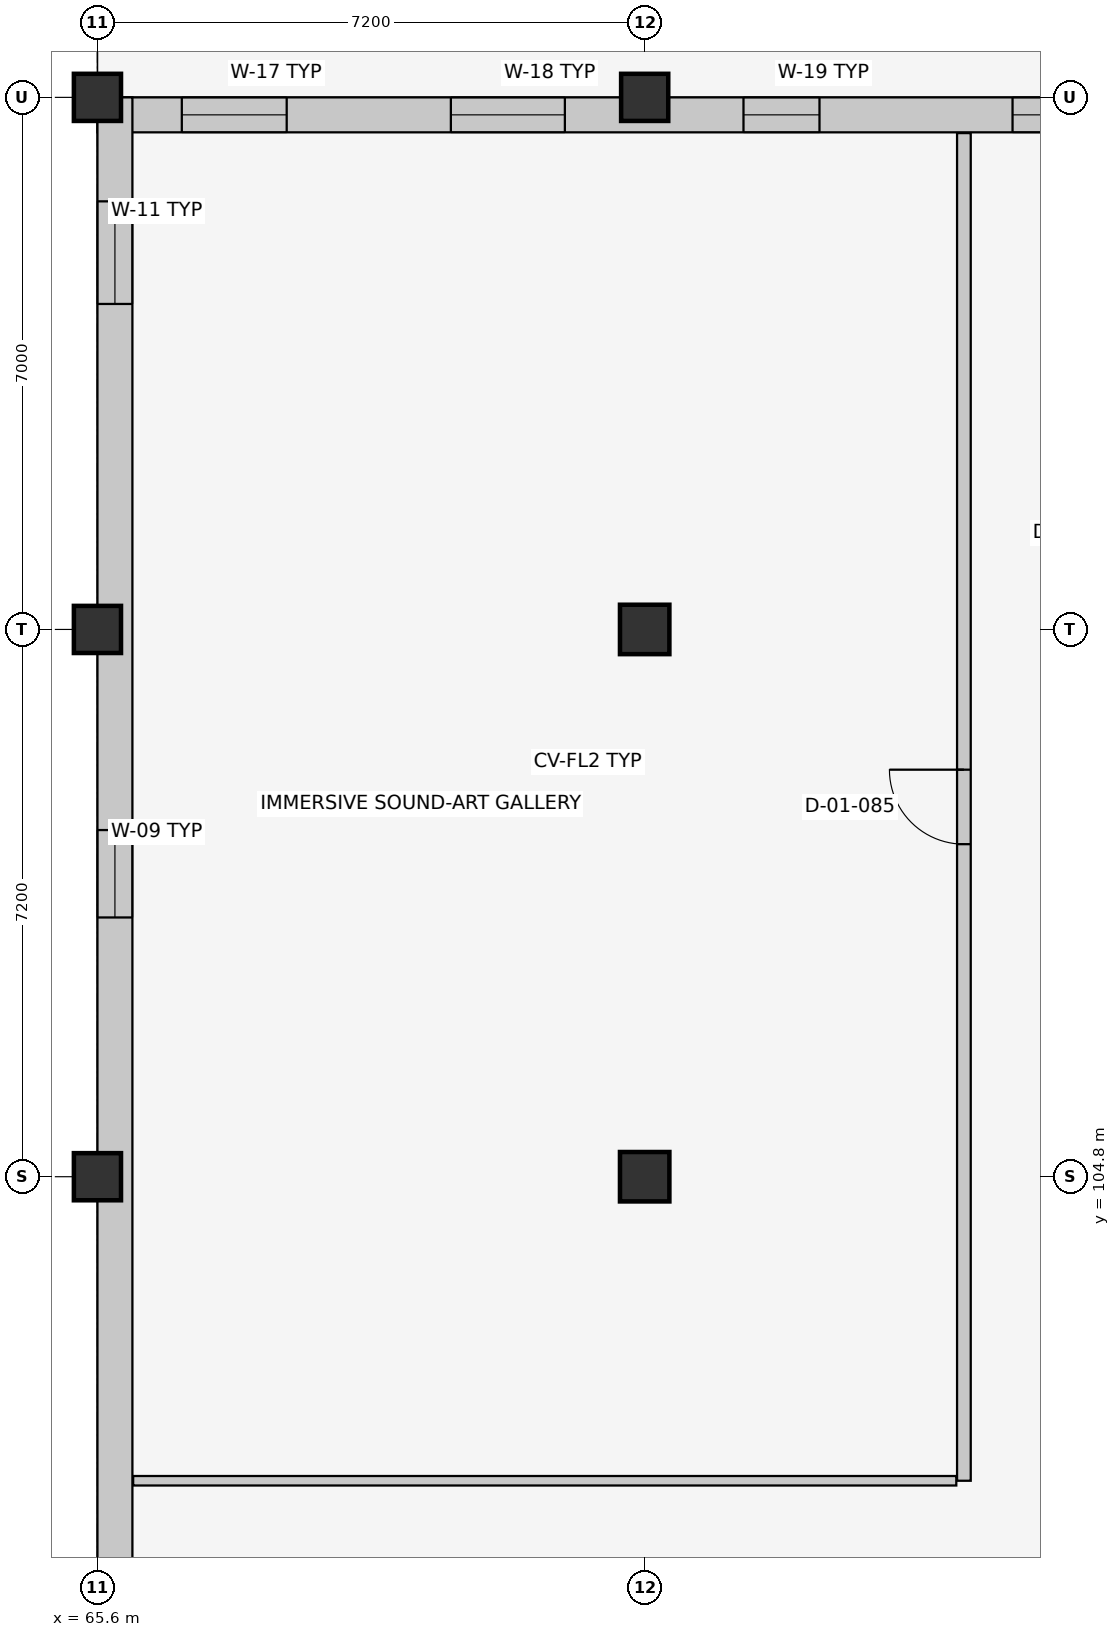
"""IFC4 building model, lengths in metres.
Left out: names, types, materials, properties, quantities, classifications, styles, units other than length and angle.
Written with IfcOpenShell. Run it as: python <this file> out.ifc"""

import sys

from ifc_helpers import new_model, si_unit, direction, frame, frame_2d, origin, origin_2d, place, context, subcontext, project, spatial, rectangle, extrude, element, fill, save


model = new_model("IFC4")
c1 = context("Model", 3, precision=1e-05, world=origin(), true_north=direction((0.0, 1.0)))
c2 = subcontext(c1, "Body", "Model", "MODEL_VIEW")
j1 = project(units=[si_unit("LENGTHUNIT", "METRE"), si_unit("PLANEANGLEUNIT", "RADIAN")], contexts=[c1])
p1 = place(None, origin())
s1 = spatial("IfcSite", under=j1, at=p1, CompositionType="ELEMENT")
p2 = place(p1, origin())
s2 = spatial("IfcBuilding", under=s1, at=p2, CompositionType="ELEMENT")
p3 = place(p2, frame((0.0, 0.0, 5.4)))
s3 = spatial("IfcBuildingStorey", under=s2, at=p3, CompositionType="ELEMENT", Elevation=5.4)
for number, where, z_axis, x_axis in (
    (1, (65.6, 104.8, 0.0), (0.0, 0.0, 1.0), (1.0, 0.0, 0.0)),
    (2, (65.6, 112.0, 0.0), (0.0, 0.0, 1.0), (1.0, 0.0, 0.0)),
    (3, (65.6, 119.0, 0.0), (0.0, 0.0, 1.0), (1.0, 0.0, 0.0)),
):
    element("IfcColumn", number, at=place(p3, frame(where, z_axis=z_axis, x_axis=x_axis)), inside=s3, PredefinedType="COLUMN", context=c2, shape_type="SweptSolid", body=[
        extrude(rectangle(XDim=0.62, YDim=0.62, at=origin_2d()), origin(), (0.0, 0.0, 1.0), 4.2),
    ])
for number, where, z_axis, x_axis in (
    (4, (72.8, 104.8, 0.0), (0.0, 0.0, 1.0), (1.0, 0.0, 0.0)),
    (5, (72.8, 112.0, 0.0), (0.0, 0.0, 1.0), (1.0, 0.0, 0.0)),
):
    element("IfcColumn", number, at=place(p3, frame(where, z_axis=z_axis, x_axis=x_axis)), inside=s3, PredefinedType="COLUMN", context=c2, shape_type="SweptSolid", body=[
        extrude(rectangle(XDim=0.65, YDim=0.65, at=origin_2d()), origin(), (0.0, 0.0, 1.0), 4.2),
    ])
p4 = place(p3, frame((72.8, 119.0, 0.0), z_axis=(0.0, 0.0, 1.0), x_axis=(1.0, 0.0, 0.0)))
e6 = element("IfcColumn", 6, at=p4, inside=s3, PredefinedType="COLUMN", context=c2, shape_type="SweptSolid", body=[
    extrude(rectangle(XDim=0.62, YDim=0.62, at=origin_2d()), origin(), (0.0, 0.0, 1.0), 4.2),
])
p5 = place(p3, frame((65.6, 118.77, 0.0), z_axis=(0.0, 0.0, 1.0), x_axis=(1.0, 0.0, 0.0)))
e7 = element("IfcWall", 7, at=p5, inside=s3, PredefinedType="SOLIDWALL", context=c2, shape_type="SweptSolid", body=[
    extrude(rectangle(XDim=43.2, YDim=0.46, at=frame_2d((21.6, 0.0))), origin(), (0.0, 0.0, 1.0), 3.215),
])
p6 = place(p5, frame((1.11, 0.0, 0.9)))
e8 = element("IfcOpeningElement", 8, at=p6, cuts=e7, PredefinedType="OPENING", context=c2, shape_type="SweptSolid", body=[
    extrude(rectangle(XDim=1.38, YDim=1.6, at=frame_2d((0.69, 0.8))), frame((0.0, 0.242, 0.0), z_axis=(0.0, -1.0, 0.0), x_axis=(1.0, 0.0, 0.0)), (0.0, 0.0, 1.0), 0.484),
])
p7 = place(p5, frame((4.65, 0.0, 0.9)))
e9 = element("IfcOpeningElement", 9, at=p7, cuts=e7, PredefinedType="OPENING", context=c2, shape_type="SweptSolid", body=[
    extrude(rectangle(XDim=1.5, YDim=1.6, at=frame_2d((0.75, 0.8))), frame((0.0, 0.242, 0.0), z_axis=(0.0, -1.0, 0.0), x_axis=(1.0, 0.0, 0.0)), (0.0, 0.0, 1.0), 0.484),
])
p8 = place(p5, frame((8.5, 0.0, 0.9)))
e10 = element("IfcOpeningElement", 10, at=p8, cuts=e7, PredefinedType="OPENING", context=c2, shape_type="SweptSolid", body=[
    extrude(rectangle(XDim=1.0, YDim=1.75, at=frame_2d((0.5, 0.875))), frame((0.0, 0.242, 0.0), z_axis=(0.0, -1.0, 0.0), x_axis=(1.0, 0.0, 0.0)), (0.0, 0.0, 1.0), 0.484),
])
p9 = place(p5, frame((12.04, 0.0, 0.9)))
e11 = element("IfcOpeningElement", 11, at=p9, cuts=e7, PredefinedType="OPENING", context=c2, shape_type="SweptSolid", body=[
    extrude(rectangle(XDim=1.12, YDim=1.75, at=frame_2d((0.56, 0.875))), frame((0.0, 0.242, 0.0), z_axis=(0.0, -1.0, 0.0), x_axis=(1.0, 0.0, 0.0)), (0.0, 0.0, 1.0), 0.484),
])
p10 = place(p5, frame((15.58, 0.0, 0.9)))
e12 = element("IfcOpeningElement", 12, at=p10, cuts=e7, PredefinedType="OPENING", context=c2, shape_type="SweptSolid", body=[
    extrude(rectangle(XDim=1.24, YDim=1.75, at=frame_2d((0.62, 0.875))), frame((0.0, 0.242, 0.0), z_axis=(0.0, -1.0, 0.0), x_axis=(1.0, 0.0, 0.0)), (0.0, 0.0, 1.0), 0.484),
])
p11 = place(p5, frame((19.13, 0.0, 0.9)))
e13 = element("IfcOpeningElement", 13, at=p11, cuts=e7, PredefinedType="OPENING", context=c2, shape_type="SweptSolid", body=[
    extrude(rectangle(XDim=1.34, YDim=1.75, at=frame_2d((0.67, 0.875))), frame((0.0, 0.242, 0.0), z_axis=(0.0, -1.0, 0.0), x_axis=(1.0, 0.0, 0.0)), (0.0, 0.0, 1.0), 0.484),
])
p12 = place(p5, frame((22.68, 0.0, 0.9)))
e14 = element("IfcOpeningElement", 14, at=p12, cuts=e7, PredefinedType="OPENING", context=c2, shape_type="SweptSolid", body=[
    extrude(rectangle(XDim=1.44, YDim=1.75, at=frame_2d((0.72, 0.875))), frame((0.0, 0.242, 0.0), z_axis=(0.0, -1.0, 0.0), x_axis=(1.0, 0.0, 0.0)), (0.0, 0.0, 1.0), 0.484),
])
p13 = place(p5, frame((26.25, 0.0, 0.9)))
e15 = element("IfcOpeningElement", 15, at=p13, cuts=e7, PredefinedType="OPENING", context=c2, shape_type="SweptSolid", body=[
    extrude(rectangle(XDim=1.5, YDim=1.75, at=frame_2d((0.75, 0.875))), frame((0.0, 0.242, 0.0), z_axis=(0.0, -1.0, 0.0), x_axis=(1.0, 0.0, 0.0)), (0.0, 0.0, 1.0), 0.484),
])
p14 = place(p5, frame((30.15, 0.0, 0.9)))
e16 = element("IfcOpeningElement", 16, at=p14, cuts=e7, PredefinedType="OPENING", context=c2, shape_type="SweptSolid", body=[
    extrude(rectangle(XDim=0.9, YDim=1.35, at=frame_2d((0.45, 0.675))), frame((0.0, 0.242, 0.0), z_axis=(0.0, -1.0, 0.0), x_axis=(1.0, 0.0, 0.0)), (0.0, 0.0, 1.0), 0.484),
])
p15 = place(p5, frame((33.7, 0.0, 0.9)))
e17 = element("IfcOpeningElement", 17, at=p15, cuts=e7, PredefinedType="OPENING", context=c2, shape_type="SweptSolid", body=[
    extrude(rectangle(XDim=1.0, YDim=1.35, at=frame_2d((0.5, 0.675))), frame((0.0, 0.242, 0.0), z_axis=(0.0, -1.0, 0.0), x_axis=(1.0, 0.0, 0.0)), (0.0, 0.0, 1.0), 0.484),
])
p16 = place(p5, frame((37.25, 0.0, 0.9)))
e18 = element("IfcOpeningElement", 18, at=p16, cuts=e7, PredefinedType="OPENING", context=c2, shape_type="SweptSolid", body=[
    extrude(rectangle(XDim=1.1, YDim=1.35, at=frame_2d((0.55, 0.675))), frame((0.0, 0.242, 0.0), z_axis=(0.0, -1.0, 0.0), x_axis=(1.0, 0.0, 0.0)), (0.0, 0.0, 1.0), 0.484),
])
p17 = place(p5, frame((40.8, 0.0, 0.9)))
e19 = element("IfcOpeningElement", 19, at=p17, cuts=e7, PredefinedType="OPENING", context=c2, shape_type="SweptSolid", body=[
    extrude(rectangle(XDim=1.2, YDim=1.35, at=frame_2d((0.6, 0.675))), frame((0.0, 0.242, 0.0), z_axis=(0.0, -1.0, 0.0), x_axis=(1.0, 0.0, 0.0)), (0.0, 0.0, 1.0), 0.484),
])
p18 = place(p3, frame((65.83, 90.4, 0.0), z_axis=(0.0, 0.0, 1.0), x_axis=(0.0, 1.0, 0.0)))
e20 = element("IfcWall", 20, at=p18, inside=s3, PredefinedType="SOLIDWALL", context=c2, shape_type="SweptSolid", body=[
    extrude(rectangle(XDim=28.6, YDim=0.46, at=frame_2d((14.3, 0.0))), origin(), (0.0, 0.0, 1.0), 3.175),
])
p19 = place(p18, frame((1.393, 0.0, 0.9)))
e21 = element("IfcOpeningElement", 21, at=p19, cuts=e20, PredefinedType="OPENING", context=c2, shape_type="SweptSolid", body=[
    extrude(rectangle(XDim=1.3, YDim=1.35, at=frame_2d((0.65, 0.675))), frame((0.0, 0.242, 0.0), z_axis=(0.0, -1.0, 0.0), x_axis=(1.0, 0.0, 0.0)), (0.0, 0.0, 1.0), 0.484),
])
p20 = place(p18, frame((17.811, 0.0, 0.9)))
e22 = element("IfcOpeningElement", 22, at=p20, cuts=e20, PredefinedType="OPENING", context=c2, shape_type="SweptSolid", body=[
    extrude(rectangle(XDim=1.15, YDim=1.45, at=frame_2d((0.575, 0.725))), frame((0.0, 0.242, 0.0), z_axis=(0.0, -1.0, 0.0), x_axis=(1.0, 0.0, 0.0)), (0.0, 0.0, 1.0), 0.484),
])
p21 = place(p18, frame((25.882, 0.0, 0.9)))
e23 = element("IfcOpeningElement", 23, at=p21, cuts=e20, PredefinedType="OPENING", context=c2, shape_type="SweptSolid", body=[
    extrude(rectangle(XDim=1.35, YDim=1.45, at=frame_2d((0.675, 0.725))), frame((0.0, 0.242, 0.0), z_axis=(0.0, -1.0, 0.0), x_axis=(1.0, 0.0, 0.0)), (0.0, 0.0, 1.0), 0.484),
])
p22 = place(p3, frame((77.0, 100.8, 0.0), z_axis=(0.0, 0.0, 1.0), x_axis=(0.0, 1.0, 0.0)))
e24 = element("IfcWall", 24, at=p22, inside=s3, PredefinedType="PARTITIONING", context=c2, shape_type="SweptSolid", body=[
    extrude(rectangle(XDim=17.73, YDim=0.18, at=frame_2d((8.865, 0.0))), origin(), (0.0, 0.0, 1.0), 3.92),
])
p23 = place(p22, frame((8.375, 0.0, 0.0)))
e25 = element("IfcOpeningElement", 25, at=p23, cuts=e24, PredefinedType="OPENING", context=c2, shape_type="SweptSolid", body=[
    extrude(rectangle(XDim=0.98, YDim=2.12, at=frame_2d((0.49, 1.06))), frame((0.0, 0.102, 0.0), z_axis=(0.0, -1.0, 0.0), x_axis=(1.0, 0.0, 0.0)), (0.0, 0.0, 1.0), 0.204),
])
p24 = place(p3, frame((66.07, 100.8, 0.0), z_axis=(0.0, 0.0, 1.0), x_axis=(1.0, 0.0, 0.0)))
e26 = element("IfcWall", 26, at=p24, inside=s3, PredefinedType="PARTITIONING", context=c2, shape_type="SweptSolid", body=[
    extrude(rectangle(XDim=10.83, YDim=0.125, at=frame_2d((5.415, 0.0))), origin(), (0.0, 0.0, 1.0), 3.92),
])
p25 = place(p6, origin())
e27 = element("IfcWindow", 27, at=p25, inside=s3, PartitioningType="SINGLE_PANEL", PredefinedType="WINDOW", context=c2, shape_type="SweptSolid", body=[
    extrude(rectangle(XDim=1.38, YDim=1.6, at=frame_2d((0.69, 0.8))), frame((0.0, 0.03, 0.0), z_axis=(0.0, -1.0, 0.0), x_axis=(1.0, 0.0, 0.0)), (0.0, 0.0, 1.0), 0.06),
])
fill(e8, e27)
p26 = place(p7, origin())
e28 = element("IfcWindow", 28, at=p26, inside=s3, PartitioningType="SINGLE_PANEL", PredefinedType="WINDOW", context=c2, shape_type="SweptSolid", body=[
    extrude(rectangle(XDim=1.5, YDim=1.6, at=frame_2d((0.75, 0.8))), frame((0.0, 0.03, 0.0), z_axis=(0.0, -1.0, 0.0), x_axis=(1.0, 0.0, 0.0)), (0.0, 0.0, 1.0), 0.06),
])
fill(e9, e28)
p27 = place(p8, origin())
e29 = element("IfcWindow", 29, at=p27, inside=s3, PartitioningType="SINGLE_PANEL", PredefinedType="WINDOW", context=c2, shape_type="SweptSolid", body=[
    extrude(rectangle(XDim=1.0, YDim=1.75, at=frame_2d((0.5, 0.875))), frame((0.0, 0.03, 0.0), z_axis=(0.0, -1.0, 0.0), x_axis=(1.0, 0.0, 0.0)), (0.0, 0.0, 1.0), 0.06),
])
fill(e10, e29)
p28 = place(p9, origin())
e30 = element("IfcWindow", 30, at=p28, inside=s3, PartitioningType="SINGLE_PANEL", PredefinedType="WINDOW", context=c2, shape_type="SweptSolid", body=[
    extrude(rectangle(XDim=1.12, YDim=1.75, at=frame_2d((0.56, 0.875))), frame((0.0, 0.03, 0.0), z_axis=(0.0, -1.0, 0.0), x_axis=(1.0, 0.0, 0.0)), (0.0, 0.0, 1.0), 0.06),
])
fill(e11, e30)
p29 = place(p20, origin())
e31 = element("IfcWindow", 31, at=p29, inside=s3, PartitioningType="SINGLE_PANEL", PredefinedType="WINDOW", context=c2, shape_type="SweptSolid", body=[
    extrude(rectangle(XDim=1.15, YDim=1.45, at=frame_2d((0.575, 0.725))), frame((0.0, 0.03, 0.0), z_axis=(0.0, -1.0, 0.0), x_axis=(1.0, 0.0, 0.0)), (0.0, 0.0, 1.0), 0.06),
])
fill(e22, e31)
p30 = place(p21, origin())
e32 = element("IfcWindow", 32, at=p30, inside=s3, PartitioningType="SINGLE_PANEL", PredefinedType="WINDOW", context=c2, shape_type="SweptSolid", body=[
    extrude(rectangle(XDim=1.35, YDim=1.45, at=frame_2d((0.675, 0.725))), frame((0.0, 0.03, 0.0), z_axis=(0.0, -1.0, 0.0), x_axis=(1.0, 0.0, 0.0)), (0.0, 0.0, 1.0), 0.06),
])
fill(e23, e32)
p31 = place(p23, origin())
e33 = element("IfcDoor", 33, at=p31, inside=s3, OperationType="SINGLE_SWING_RIGHT", PredefinedType="DOOR", context=c2, shape_type="SweptSolid", body=[
    extrude(rectangle(XDim=0.98, YDim=2.12, at=frame_2d((0.49, 1.06))), frame((0.0, 0.025, 0.0), z_axis=(0.0, -1.0, 0.0), x_axis=(1.0, 0.0, 0.0)), (0.0, 0.0, 1.0), 0.05),
])
fill(e25, e33)
save(model, sys.argv[1])
